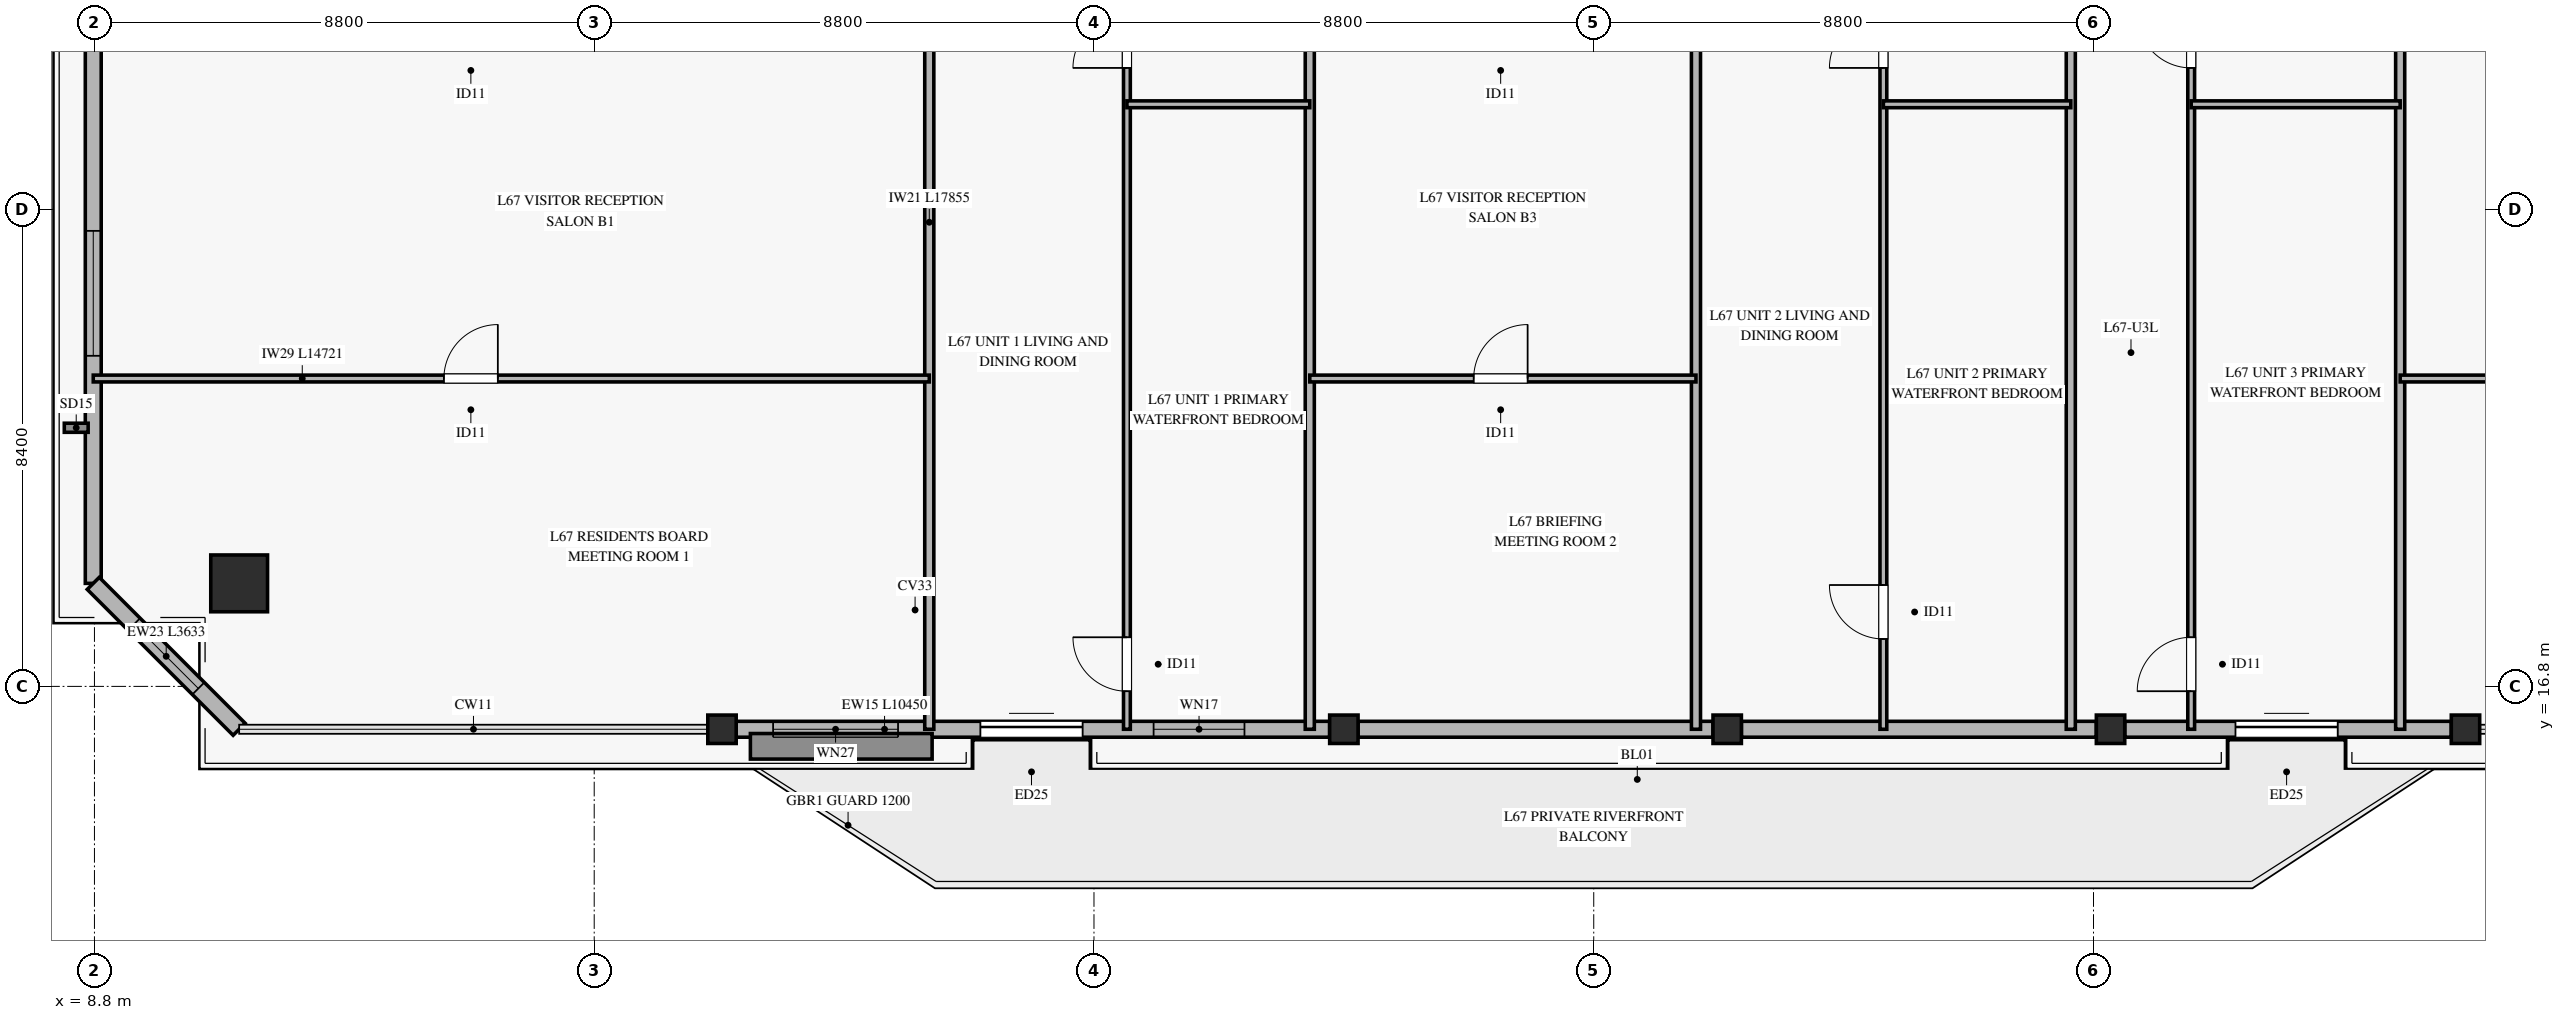
"""IFC4 building model, lengths in metres.
Left out: names, types, materials, properties, quantities, classifications, styles, units other than length and angle.
Written with IfcOpenShell. Run it as: python <this file> out.ifc"""

import sys

from ifc_helpers import new_model, si_unit, direction, frame, frame_2d, origin, origin_2d, place, context, subcontext, project, spatial, rectangle, hollow_rectangle, extrude, source, transform, mapped, element, fill, save


model = new_model("IFC4")
c1 = context("Model", 3, precision=1e-05, world=origin(), true_north=direction((0.0, 1.0)))
c2 = subcontext(c1, "Body", "Model", "MODEL_VIEW")
j1 = project(units=[si_unit("LENGTHUNIT", "METRE"), si_unit("PLANEANGLEUNIT", "RADIAN")], contexts=[c1])
p1 = place(None, origin())
s1 = spatial("IfcSite", under=j1, at=p1, CompositionType="ELEMENT")
p2 = place(p1, origin())
s2 = spatial("IfcBuilding", under=s1, at=p2, CompositionType="ELEMENT")
p3 = place(p2, frame((0.0, 0.0, 262.1)))
s3 = spatial("IfcBuildingStorey", under=s2, at=p3, CompositionType="ELEMENT", Elevation=262.1)
m1 = source(origin(), c2, "Body", "SweptSolid", [
    extrude(hollow_rectangle(XDim=1.0, YDim=1.0, WallThickness=0.045, at=origin_2d()), origin(), (0.0, 0.0, 1.0), 3.185),
])
p4 = place(p3, frame((11.348, 18.614, 0.0), z_axis=(0.0, 0.0, 1.0), x_axis=(1.0, 0.0, 0.0)))
e1 = element("IfcColumn", 1, at=p4, inside=s3, PredefinedType="COLUMN", context=c2, shape_type="MappedRepresentation", body=[
    mapped(m1, transform((0.0, 0.0, 0.0), x_axis=(1.0, 0.0, 0.0), y_axis=(0.0, 1.0, 0.0), z_axis=(0.0, 0.0, 1.0), scale=1.0)),
])
m2 = source(origin(), c2, "Body", "SweptSolid", [
    extrude(hollow_rectangle(XDim=0.5, YDim=0.5, WallThickness=0.024, at=origin_2d()), origin(), (0.0, 0.0, 1.0), 3.185),
])
for number, where, z_axis, x_axis in (
    (2, (19.85, 16.045, 0.0), (0.0, 0.0, 1.0), (1.0, 0.0, 0.0)),
    (3, (30.8, 16.045, 0.0), (0.0, 0.0, 1.0), (1.0, 0.0, 0.0)),
    (4, (37.55, 16.045, 0.0), (0.0, 0.0, 1.0), (1.0, 0.0, 0.0)),
    (5, (44.3, 16.045, 0.0), (0.0, 0.0, 1.0), (1.0, 0.0, 0.0)),
    (6, (50.55, 16.045, 0.0), (0.0, 0.0, 1.0), (1.0, 0.0, 0.0)),
):
    element("IfcColumn", number, at=place(p3, frame(where, z_axis=z_axis, x_axis=x_axis)), inside=s3, PredefinedType="COLUMN", context=c2, shape_type="MappedRepresentation", body=[
        mapped(m2, transform((0.0, 0.0, 0.0), x_axis=(1.0, 0.0, 0.0), y_axis=(0.0, 1.0, 0.0), z_axis=(0.0, 0.0, 1.0), scale=1.0)),
    ])
p5 = place(p3, frame((20.1, 16.045, 0.0), z_axis=(0.0, 0.0, 1.0), x_axis=(1.0, 0.0, 0.0)))
e7 = element("IfcWall", 7, at=p5, inside=s3, PredefinedType="SOLIDWALL", context=c2, shape_type="SweptSolid", body=[
    extrude(rectangle(XDim=10.45, YDim=0.28, at=frame_2d((5.225, 0.0))), origin(), (0.0, 0.0, 1.0), 2.815),
])
p6 = place(p5, frame((4.3, 0.0, 0.0)))
e8 = element("IfcOpeningElement", 8, at=p6, cuts=e7, PredefinedType="OPENING", context=c2, shape_type="SweptSolid", body=[
    extrude(rectangle(XDim=1.8, YDim=2.25, at=frame_2d((0.9, 1.125))), frame((0.0, 0.15, 0.0), z_axis=(0.0, -1.0, 0.0), x_axis=(1.0, 0.0, 0.0)), (0.0, 0.0, 1.0), 0.3),
])
p7 = place(p5, frame((0.65, 0.0, 0.45)))
e9 = element("IfcOpeningElement", 9, at=p7, cuts=e7, PredefinedType="OPENING", context=c2, shape_type="SweptSolid", body=[
    extrude(rectangle(XDim=2.2, YDim=2.1, at=frame_2d((1.1, 1.05))), frame((0.0, 0.15, 0.0), z_axis=(0.0, -1.0, 0.0), x_axis=(1.0, 0.0, 0.0)), (0.0, 0.0, 1.0), 0.3),
])
p8 = place(p5, frame((7.35, 0.0, 0.45)))
e10 = element("IfcOpeningElement", 10, at=p8, cuts=e7, PredefinedType="OPENING", context=c2, shape_type="SweptSolid", body=[
    extrude(rectangle(XDim=1.6, YDim=2.0, at=frame_2d((0.8, 1.0))), frame((0.0, 0.15, 0.0), z_axis=(0.0, -1.0, 0.0), x_axis=(1.0, 0.0, 0.0)), (0.0, 0.0, 1.0), 0.3),
])
for number, where, z_axis, x_axis in (
    (11, (31.05, 16.045, 0.0), (0.0, 0.0, 1.0), (1.0, 0.0, 0.0)),
    (12, (37.8, 16.045, 0.0), (0.0, 0.0, 1.0), (1.0, 0.0, 0.0)),
):
    element("IfcWall", number, at=place(p3, frame(where, z_axis=z_axis, x_axis=x_axis)), inside=s3, PredefinedType="SOLIDWALL", context=c2, shape_type="SweptSolid", body=[
        extrude(rectangle(XDim=6.25, YDim=0.28, at=frame_2d((3.125, 0.0))), origin(), (0.0, 0.0, 1.0), 2.815),
    ])
p9 = place(p3, frame((44.55, 16.045, 0.0), z_axis=(0.0, 0.0, 1.0), x_axis=(1.0, 0.0, 0.0)))
e13 = element("IfcWall", 13, at=p9, inside=s3, PredefinedType="SOLIDWALL", context=c2, shape_type="SweptSolid", body=[
    extrude(rectangle(XDim=5.75, YDim=0.28, at=frame_2d((2.875, 0.0))), origin(), (0.0, 0.0, 1.0), 2.815),
])
p10 = place(p9, frame((1.95, 0.0, 0.0)))
e14 = element("IfcOpeningElement", 14, at=p10, cuts=e13, PredefinedType="OPENING", context=c2, shape_type="SweptSolid", body=[
    extrude(rectangle(XDim=1.8, YDim=2.25, at=frame_2d((0.9, 1.125))), frame((0.0, 0.15, 0.0), z_axis=(0.0, -1.0, 0.0), x_axis=(1.0, 0.0, 0.0)), (0.0, 0.0, 1.0), 0.3),
])
p11 = place(p3, frame((8.779, 18.614, 0.0), z_axis=(0.0, 0.0, 1.0), x_axis=(0.0, 1.0, 0.0)))
e15 = element("IfcWall", 15, at=p11, inside=s3, PredefinedType="SOLIDWALL", context=c2, shape_type="SweptSolid", body=[
    extrude(rectangle(XDim=12.208, YDim=0.28, at=frame_2d((6.104, 0.0))), origin(), (0.0, 0.0, 1.0), 2.815),
])
p12 = place(p11, frame((4.007, 0.0, 0.45)))
e16 = element("IfcOpeningElement", 16, at=p12, cuts=e15, PredefinedType="OPENING", context=c2, shape_type="SweptSolid", body=[
    extrude(rectangle(XDim=2.2, YDim=2.1, at=frame_2d((1.1, 1.05))), frame((0.0, 0.15, 0.0), z_axis=(0.0, -1.0, 0.0), x_axis=(1.0, 0.0, 0.0)), (0.0, 0.0, 1.0), 0.3),
])
p13 = place(p3, frame((8.779, 18.614, 0.0), z_axis=(0.0, 0.0, 1.0), x_axis=(0.707073180636, -0.70714038014, 0.0)))
e17 = element("IfcWall", 17, at=p13, inside=s3, PredefinedType="SOLIDWALL", context=c2, shape_type="SweptSolid", body=[
    extrude(rectangle(XDim=3.633, YDim=0.3, at=frame_2d((1.816, 0.0))), origin(), (0.0, 0.0, 1.0), 2.815),
])
p14 = place(p13, frame((1.017, 0.0, 0.45)))
e18 = element("IfcOpeningElement", 18, at=p14, cuts=e17, PredefinedType="OPENING", context=c2, shape_type="SweptSolid", body=[
    extrude(rectangle(XDim=1.6, YDim=2.0, at=frame_2d((0.8, 1.0))), frame((0.0, 0.16, 0.0), z_axis=(0.0, -1.0, 0.0), x_axis=(1.0, 0.0, 0.0)), (0.0, 0.0, 1.0), 0.32),
])
for number, where, z_axis, x_axis in (
    (19, (23.5, 16.045, 0.0), (0.0, 0.0, 1.0), (0.0, 1.0, 0.0)),
    (20, (30.2, 16.045, 0.0), (0.0, 0.0, 1.0), (0.0, 1.0, 0.0)),
    (21, (37.0, 16.045, 0.0), (0.0, 0.0, 1.0), (0.0, 1.0, 0.0)),
    (22, (43.6, 16.045, 0.0), (0.0, 0.0, 1.0), (0.0, 1.0, 0.0)),
    (23, (49.4, 16.045, 0.0), (0.0, 0.0, 1.0), (0.0, 1.0, 0.0)),
):
    element("IfcWall", number, at=place(p3, frame(where, z_axis=z_axis, x_axis=x_axis)), inside=s3, PredefinedType="PARTITIONING", context=c2, shape_type="SweptSolid", body=[
        extrude(rectangle(XDim=17.855, YDim=0.16, at=frame_2d((8.927, 0.0))), origin(), (0.0, 0.0, 1.0), 2.77),
    ])
p15 = place(p3, frame((8.779, 22.221, 0.0), z_axis=(0.0, 0.0, 1.0), x_axis=(1.0, 0.0, 0.0)))
e24 = element("IfcWall", 24, at=p15, inside=s3, PredefinedType="PARTITIONING", context=c2, shape_type="SweptSolid", body=[
    extrude(rectangle(XDim=14.721, YDim=0.12, at=frame_2d((7.36, 0.0))), origin(), (0.0, 0.0, 1.0), 2.47),
])
p16 = place(p15, frame((6.174, 0.0, 0.0)))
e25 = element("IfcOpeningElement", 25, at=p16, cuts=e24, PredefinedType="OPENING", context=c2, shape_type="SweptSolid", body=[
    extrude(rectangle(XDim=0.95, YDim=2.1, at=frame_2d((0.475, 1.05))), frame((0.0, 0.07, 0.0), z_axis=(0.0, -1.0, 0.0), x_axis=(1.0, 0.0, 0.0)), (0.0, 0.0, 1.0), 0.14),
])
p17 = place(p3, frame((26.98, 16.045, 0.0), z_axis=(0.0, 0.0, 1.0), x_axis=(0.0, 1.0, 0.0)))
e26 = element("IfcWall", 26, at=p17, inside=s3, PredefinedType="PARTITIONING", context=c2, shape_type="SweptSolid", body=[
    extrude(rectangle(XDim=15.205, YDim=0.12, at=frame_2d((7.603, 0.0))), origin(), (0.0, 0.0, 1.0), 2.77),
])
p18 = place(p17, frame((0.67, 0.0, 0.0)))
e27 = element("IfcOpeningElement", 27, at=p18, cuts=e26, PredefinedType="OPENING", context=c2, shape_type="SweptSolid", body=[
    extrude(rectangle(XDim=0.95, YDim=2.1, at=frame_2d((0.475, 1.05))), frame((0.0, 0.07, 0.0), z_axis=(0.0, -1.0, 0.0), x_axis=(1.0, 0.0, 0.0)), (0.0, 0.0, 1.0), 0.14),
])
p19 = place(p17, frame((11.645, 0.0, 0.0)))
e28 = element("IfcOpeningElement", 28, at=p19, cuts=e26, PredefinedType="OPENING", context=c2, shape_type="SweptSolid", body=[
    extrude(rectangle(XDim=0.95, YDim=2.1, at=frame_2d((0.475, 1.05))), frame((0.0, 0.07, 0.0), z_axis=(0.0, -1.0, 0.0), x_axis=(1.0, 0.0, 0.0)), (0.0, 0.0, 1.0), 0.14),
])
p20 = place(p3, frame((26.98, 27.05, 0.0), z_axis=(0.0, 0.0, 1.0), x_axis=(1.0, 0.0, 0.0)))
e29 = element("IfcWall", 29, at=p20, inside=s3, PredefinedType="PARTITIONING", context=c2, shape_type="SweptSolid", body=[
    extrude(rectangle(XDim=3.22, YDim=0.12, at=frame_2d((1.61, 0.0))), origin(), (0.0, 0.0, 1.0), 3.185),
])
p21 = place(p3, frame((30.2, 22.221, 0.0), z_axis=(0.0, 0.0, 1.0), x_axis=(1.0, 0.0, 0.0)))
e30 = element("IfcWall", 30, at=p21, inside=s3, PredefinedType="PARTITIONING", context=c2, shape_type="SweptSolid", body=[
    extrude(rectangle(XDim=6.8, YDim=0.12, at=frame_2d((3.4, 0.0))), origin(), (0.0, 0.0, 1.0), 2.47),
])
p22 = place(p21, frame((2.886, 0.0, 0.0)))
e31 = element("IfcOpeningElement", 31, at=p22, cuts=e30, PredefinedType="OPENING", context=c2, shape_type="SweptSolid", body=[
    extrude(rectangle(XDim=0.95, YDim=2.1, at=frame_2d((0.475, 1.05))), frame((0.0, 0.07, 0.0), z_axis=(0.0, -1.0, 0.0), x_axis=(1.0, 0.0, 0.0)), (0.0, 0.0, 1.0), 0.14),
])
p23 = place(p3, frame((40.3, 16.045, 0.0), z_axis=(0.0, 0.0, 1.0), x_axis=(0.0, 1.0, 0.0)))
e32 = element("IfcWall", 32, at=p23, inside=s3, PredefinedType="PARTITIONING", context=c2, shape_type="SweptSolid", body=[
    extrude(rectangle(XDim=15.205, YDim=0.12, at=frame_2d((7.603, 0.0))), origin(), (0.0, 0.0, 1.0), 2.77),
])
p24 = place(p23, frame((1.59, 0.0, 0.0)))
e33 = element("IfcOpeningElement", 33, at=p24, cuts=e32, PredefinedType="OPENING", context=c2, shape_type="SweptSolid", body=[
    extrude(rectangle(XDim=0.95, YDim=2.1, at=frame_2d((0.475, 1.05))), frame((0.0, 0.07, 0.0), z_axis=(0.0, -1.0, 0.0), x_axis=(1.0, 0.0, 0.0)), (0.0, 0.0, 1.0), 0.14),
])
p25 = place(p23, frame((11.645, 0.0, 0.0)))
e34 = element("IfcOpeningElement", 34, at=p25, cuts=e32, PredefinedType="OPENING", context=c2, shape_type="SweptSolid", body=[
    extrude(rectangle(XDim=0.95, YDim=2.1, at=frame_2d((0.475, 1.05))), frame((0.0, 0.07, 0.0), z_axis=(0.0, -1.0, 0.0), x_axis=(1.0, 0.0, 0.0)), (0.0, 0.0, 1.0), 0.14),
])
p26 = place(p3, frame((40.3, 27.05, 0.0), z_axis=(0.0, 0.0, 1.0), x_axis=(1.0, 0.0, 0.0)))
e35 = element("IfcWall", 35, at=p26, inside=s3, PredefinedType="PARTITIONING", context=c2, shape_type="SweptSolid", body=[
    extrude(rectangle(XDim=3.3, YDim=0.12, at=frame_2d((1.65, 0.0))), origin(), (0.0, 0.0, 1.0), 3.185),
])
p27 = place(p3, frame((45.72, 16.045, 0.0), z_axis=(0.0, 0.0, 1.0), x_axis=(0.0, 1.0, 0.0)))
e36 = element("IfcWall", 36, at=p27, inside=s3, PredefinedType="PARTITIONING", context=c2, shape_type="SweptSolid", body=[
    extrude(rectangle(XDim=15.205, YDim=0.12, at=frame_2d((7.603, 0.0))), origin(), (0.0, 0.0, 1.0), 2.77),
])
p28 = place(p27, frame((0.67, 0.0, 0.0)))
e37 = element("IfcOpeningElement", 37, at=p28, cuts=e36, PredefinedType="OPENING", context=c2, shape_type="SweptSolid", body=[
    extrude(rectangle(XDim=0.95, YDim=2.1, at=frame_2d((0.475, 1.05))), frame((0.0, 0.07, 0.0), z_axis=(0.0, -1.0, 0.0), x_axis=(1.0, 0.0, 0.0)), (0.0, 0.0, 1.0), 0.14),
])
p29 = place(p27, frame((11.645, 0.0, 0.0)))
e38 = element("IfcOpeningElement", 38, at=p29, cuts=e36, PredefinedType="OPENING", context=c2, shape_type="SweptSolid", body=[
    extrude(rectangle(XDim=0.95, YDim=2.1, at=frame_2d((0.475, 1.05))), frame((0.0, 0.07, 0.0), z_axis=(0.0, -1.0, 0.0), x_axis=(1.0, 0.0, 0.0)), (0.0, 0.0, 1.0), 0.14),
])
p30 = place(p3, frame((45.72, 27.05, 0.0), z_axis=(0.0, 0.0, 1.0), x_axis=(1.0, 0.0, 0.0)))
e39 = element("IfcWall", 39, at=p30, inside=s3, PredefinedType="PARTITIONING", context=c2, shape_type="SweptSolid", body=[
    extrude(rectangle(XDim=3.68, YDim=0.12, at=frame_2d((1.84, 0.0))), origin(), (0.0, 0.0, 1.0), 3.185),
])
p31 = place(p3, frame((49.4, 22.221, 0.0), z_axis=(0.0, 0.0, 1.0), x_axis=(1.0, 0.0, 0.0)))
e40 = element("IfcWall", 40, at=p31, inside=s3, PredefinedType="PARTITIONING", context=c2, shape_type="SweptSolid", body=[
    extrude(rectangle(XDim=12.222, YDim=0.12, at=frame_2d((6.111, 0.0))), origin(), (0.0, 0.0, 1.0), 2.47),
])
p32 = place(p31, frame((4.975, 0.0, 0.0)))
e41 = element("IfcOpeningElement", 41, at=p32, cuts=e40, PredefinedType="OPENING", context=c2, shape_type="SweptSolid", body=[
    extrude(rectangle(XDim=0.95, YDim=2.1, at=frame_2d((0.475, 1.05))), frame((0.0, 0.07, 0.0), z_axis=(0.0, -1.0, 0.0), x_axis=(1.0, 0.0, 0.0)), (0.0, 0.0, 1.0), 0.14),
])
m3 = source(origin(), c2, "Body", "SweptSolid", [
    extrude(rectangle(XDim=1.8, YDim=2.25, at=frame_2d((0.9, 1.125))), frame((0.0, 0.025, 0.0), z_axis=(0.0, -1.0, 0.0), x_axis=(1.0, 0.0, 0.0)), (0.0, 0.0, 1.0), 0.05),
])
p33 = place(p6, origin())
e42 = element("IfcDoor", 42, at=p33, inside=s3, OperationType="SLIDING_TO_LEFT", PredefinedType="DOOR", context=c2, shape_type="MappedRepresentation", body=[
    mapped(m3, transform((0.0, 0.0, 0.0), x_axis=(1.0, 0.0, 0.0), y_axis=(0.0, 1.0, 0.0), z_axis=(0.0, 0.0, 1.0), scale=1.0)),
])
fill(e8, e42)
m4 = source(origin(), c2, "Body", "SweptSolid", [
    extrude(rectangle(XDim=2.2, YDim=2.1, at=frame_2d((1.1, 1.05))), frame((0.0, 0.03, 0.0), z_axis=(0.0, -1.0, 0.0), x_axis=(1.0, 0.0, 0.0)), (0.0, 0.0, 1.0), 0.06),
])
p34 = place(p7, origin())
e43 = element("IfcWindow", 43, at=p34, inside=s3, PartitioningType="SINGLE_PANEL", PredefinedType="WINDOW", context=c2, shape_type="MappedRepresentation", body=[
    mapped(m4, transform((0.0, 0.0, 0.0), x_axis=(1.0, 0.0, 0.0), y_axis=(0.0, 1.0, 0.0), z_axis=(0.0, 0.0, 1.0), scale=1.0)),
])
fill(e9, e43)
m5 = source(origin(), c2, "Body", "SweptSolid", [
    extrude(rectangle(XDim=1.6, YDim=2.0, at=frame_2d((0.8, 1.0))), frame((0.0, 0.03, 0.0), z_axis=(0.0, -1.0, 0.0), x_axis=(1.0, 0.0, 0.0)), (0.0, 0.0, 1.0), 0.06),
])
p35 = place(p8, origin())
e44 = element("IfcWindow", 44, at=p35, inside=s3, PartitioningType="SINGLE_PANEL", PredefinedType="WINDOW", context=c2, shape_type="MappedRepresentation", body=[
    mapped(m5, transform((0.0, 0.0, 0.0), x_axis=(1.0, 0.0, 0.0), y_axis=(0.0, 1.0, 0.0), z_axis=(0.0, 0.0, 1.0), scale=1.0)),
])
fill(e10, e44)
p36 = place(p10, origin())
e45 = element("IfcDoor", 45, at=p36, inside=s3, OperationType="SLIDING_TO_LEFT", PredefinedType="DOOR", context=c2, shape_type="MappedRepresentation", body=[
    mapped(m3, transform((0.0, 0.0, 0.0), x_axis=(1.0, 0.0, 0.0), y_axis=(0.0, 1.0, 0.0), z_axis=(0.0, 0.0, 1.0), scale=1.0)),
])
fill(e14, e45)
p37 = place(p12, origin())
e46 = element("IfcWindow", 46, at=p37, inside=s3, PartitioningType="SINGLE_PANEL", PredefinedType="WINDOW", context=c2, shape_type="MappedRepresentation", body=[
    mapped(m4, transform((0.0, 0.0, 0.0), x_axis=(1.0, 0.0, 0.0), y_axis=(0.0, 1.0, 0.0), z_axis=(0.0, 0.0, 1.0), scale=1.0)),
])
fill(e16, e46)
p38 = place(p14, origin())
e47 = element("IfcWindow", 47, at=p38, inside=s3, PartitioningType="SINGLE_PANEL", PredefinedType="WINDOW", context=c2, shape_type="MappedRepresentation", body=[
    mapped(m5, transform((0.0, 0.0, 0.0), x_axis=(1.0, 0.0, 0.0), y_axis=(0.0, 1.0, 0.0), z_axis=(0.0, 0.0, 1.0), scale=1.0)),
])
fill(e18, e47)
m6 = source(origin(), c2, "Body", "SweptSolid", [
    extrude(rectangle(XDim=0.95, YDim=2.1, at=frame_2d((0.475, 1.05))), frame((0.0, 0.025, 0.0), z_axis=(0.0, -1.0, 0.0), x_axis=(1.0, 0.0, 0.0)), (0.0, 0.0, 1.0), 0.05),
])
p39 = place(p16, origin())
e48 = element("IfcDoor", 48, at=p39, inside=s3, OperationType="SINGLE_SWING_RIGHT", PredefinedType="DOOR", context=c2, shape_type="MappedRepresentation", body=[
    mapped(m6, transform((0.0, 0.0, 0.0), x_axis=(1.0, 0.0, 0.0), y_axis=(0.0, 1.0, 0.0), z_axis=(0.0, 0.0, 1.0), scale=1.0)),
])
fill(e25, e48)
p40 = place(p18, origin())
e49 = element("IfcDoor", 49, at=p40, inside=s3, OperationType="SINGLE_SWING_RIGHT", PredefinedType="DOOR", context=c2, shape_type="MappedRepresentation", body=[
    mapped(m6, transform((0.0, 0.0, 0.0), x_axis=(1.0, 0.0, 0.0), y_axis=(0.0, 1.0, 0.0), z_axis=(0.0, 0.0, 1.0), scale=1.0)),
])
fill(e27, e49)
p41 = place(p19, origin())
e50 = element("IfcDoor", 50, at=p41, inside=s3, OperationType="SINGLE_SWING_LEFT", PredefinedType="DOOR", context=c2, shape_type="MappedRepresentation", body=[
    mapped(m6, transform((0.0, 0.0, 0.0), x_axis=(1.0, 0.0, 0.0), y_axis=(0.0, 1.0, 0.0), z_axis=(0.0, 0.0, 1.0), scale=1.0)),
])
fill(e28, e50)
p42 = place(p22, origin())
e51 = element("IfcDoor", 51, at=p42, inside=s3, OperationType="SINGLE_SWING_RIGHT", PredefinedType="DOOR", context=c2, shape_type="MappedRepresentation", body=[
    mapped(m6, transform((0.0, 0.0, 0.0), x_axis=(1.0, 0.0, 0.0), y_axis=(0.0, 1.0, 0.0), z_axis=(0.0, 0.0, 1.0), scale=1.0)),
])
fill(e31, e51)
p43 = place(p24, origin())
e52 = element("IfcDoor", 52, at=p43, inside=s3, OperationType="SINGLE_SWING_RIGHT", PredefinedType="DOOR", context=c2, shape_type="MappedRepresentation", body=[
    mapped(m6, transform((0.0, 0.0, 0.0), x_axis=(1.0, 0.0, 0.0), y_axis=(0.0, 1.0, 0.0), z_axis=(0.0, 0.0, 1.0), scale=1.0)),
])
fill(e33, e52)
p44 = place(p25, origin())
e53 = element("IfcDoor", 53, at=p44, inside=s3, OperationType="SINGLE_SWING_LEFT", PredefinedType="DOOR", context=c2, shape_type="MappedRepresentation", body=[
    mapped(m6, transform((0.0, 0.0, 0.0), x_axis=(1.0, 0.0, 0.0), y_axis=(0.0, 1.0, 0.0), z_axis=(0.0, 0.0, 1.0), scale=1.0)),
])
fill(e34, e53)
p45 = place(p28, origin())
e54 = element("IfcDoor", 54, at=p45, inside=s3, OperationType="SINGLE_SWING_LEFT", PredefinedType="DOOR", context=c2, shape_type="MappedRepresentation", body=[
    mapped(m6, transform((0.0, 0.0, 0.0), x_axis=(1.0, 0.0, 0.0), y_axis=(0.0, 1.0, 0.0), z_axis=(0.0, 0.0, 1.0), scale=1.0)),
])
fill(e37, e54)
p46 = place(p29, origin())
e55 = element("IfcDoor", 55, at=p46, inside=s3, OperationType="SINGLE_SWING_RIGHT", PredefinedType="DOOR", context=c2, shape_type="MappedRepresentation", body=[
    mapped(m6, transform((0.0, 0.0, 0.0), x_axis=(1.0, 0.0, 0.0), y_axis=(0.0, 1.0, 0.0), z_axis=(0.0, 0.0, 1.0), scale=1.0)),
])
fill(e38, e55)
save(model, sys.argv[1])
